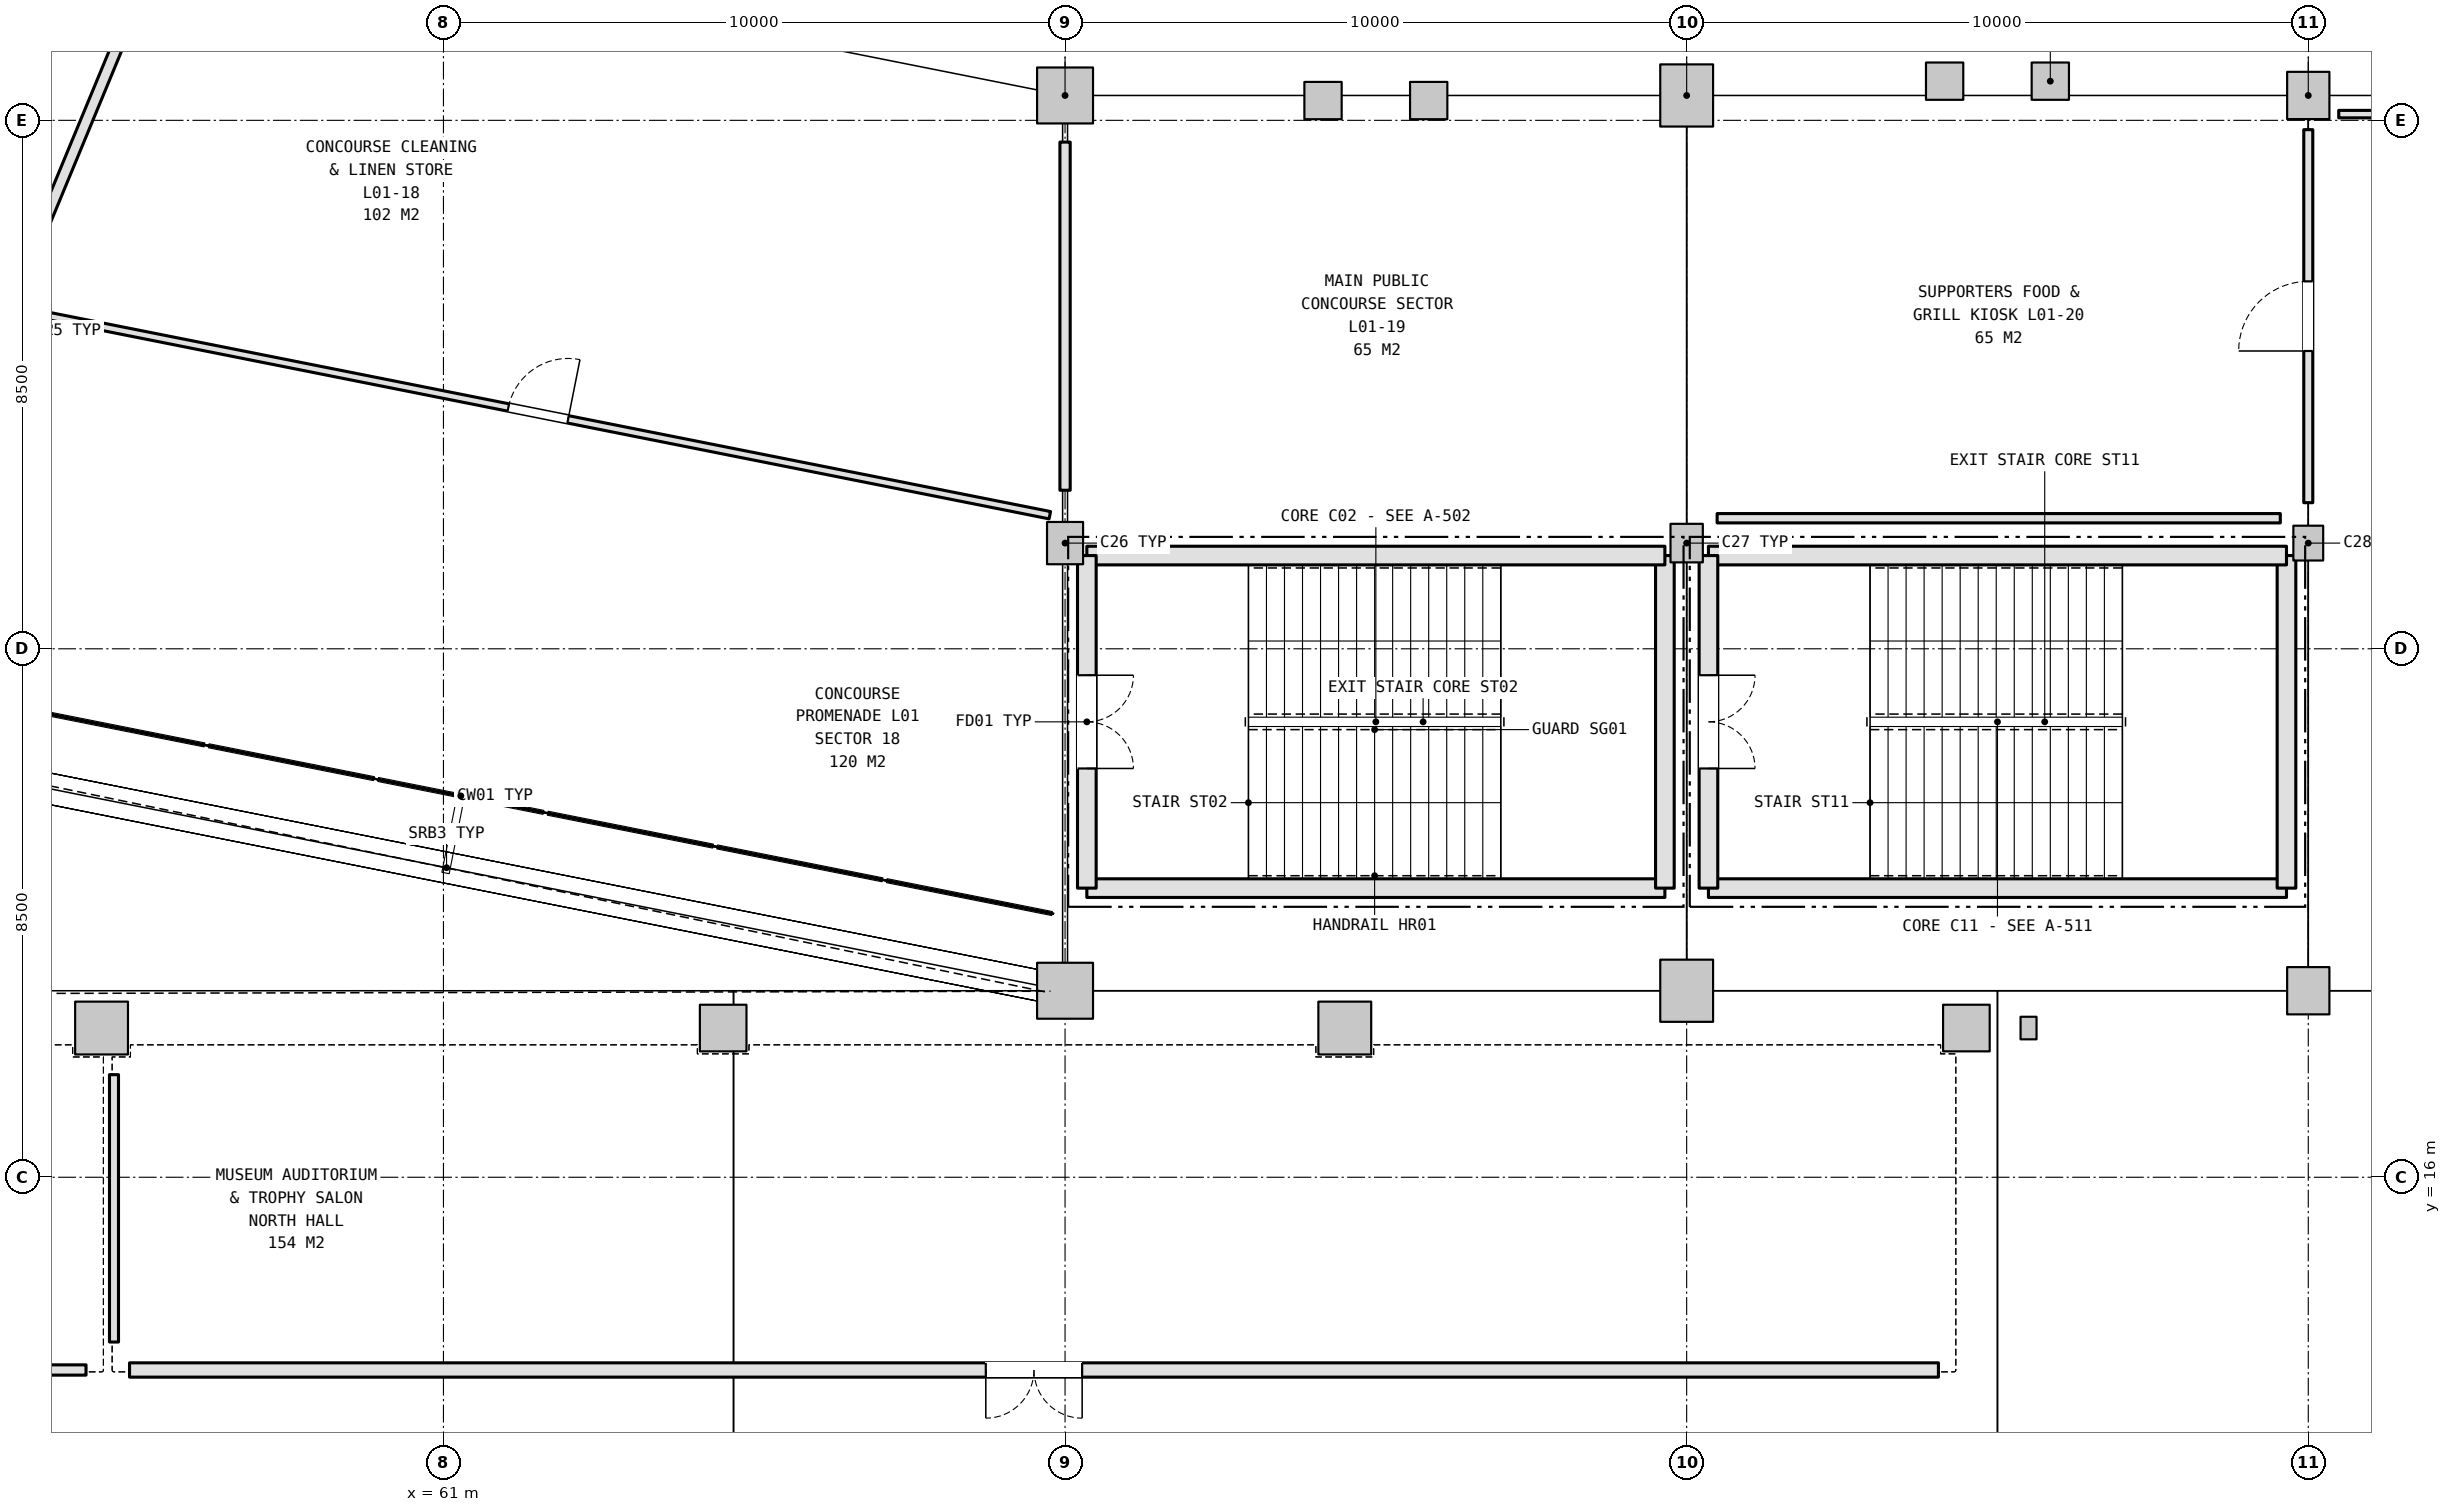
"""IFC4 building model, lengths in metres.
Left out: names, types, materials, properties, quantities, classifications, styles, units other than length and angle.
Written with IfcOpenShell. Run it as: python <this file> out.ifc"""

import sys

from ifc_helpers import new_model, si_unit, direction, frame, frame_2d, origin, origin_2d, place, context, subcontext, project, spatial, rectangle, i_section, extrude, element, fill, save


model = new_model("IFC4")
c1 = context("Model", 3, precision=1e-05, world=origin(), true_north=direction((0.0, 1.0)))
c2 = subcontext(c1, "Body", "Model", "MODEL_VIEW")
j1 = project(units=[si_unit("LENGTHUNIT", "METRE"), si_unit("PLANEANGLEUNIT", "RADIAN")], contexts=[c1])
p1 = place(None, origin())
s1 = spatial("IfcSite", under=j1, at=p1, CompositionType="ELEMENT")
p2 = place(p1, origin())
s2 = spatial("IfcBuilding", under=s1, at=p2, CompositionType="ELEMENT")
p3 = place(p2, frame((0.0, 0.0, 5.4)))
s3 = spatial("IfcBuildingStorey", under=s2, at=p3, CompositionType="ELEMENT", Elevation=5.4)
p4 = place(p3, frame((71.0, 33.4, 0.0), z_axis=(0.0, 0.0, 1.0), x_axis=(1.0, 0.0, 0.0)))
e1 = element("IfcColumn", 1, at=p4, inside=s3, PredefinedType="COLUMN", context=c2, shape_type="SweptSolid", body=[
    extrude(rectangle(XDim=0.9, YDim=0.9, at=origin_2d()), origin(), (0.0, 0.0, 1.0), 5.4),
])
p5 = place(p3, frame((71.0, 26.2, 0.0), z_axis=(0.0, 0.0, 1.0), x_axis=(1.0, 0.0, 0.0)))
e2 = element("IfcColumn", 2, at=p5, inside=s3, PredefinedType="COLUMN", context=c2, shape_type="SweptSolid", body=[
    extrude(rectangle(XDim=0.58, YDim=0.68, at=origin_2d()), origin(), (0.0, 0.0, 1.0), 5.4),
])
p6 = place(p3, frame((71.0, 19.0, 0.0), z_axis=(0.0, 0.0, 1.0), x_axis=(1.0, 0.0, 0.0)))
e3 = element("IfcColumn", 3, at=p6, inside=s3, PredefinedType="COLUMN", context=c2, shape_type="SweptSolid", body=[
    extrude(rectangle(XDim=0.9, YDim=0.9, at=origin_2d()), origin(), (0.0, 0.0, 1.0), 5.4),
])
p7 = place(p3, frame((81.0, 33.4, 0.0), z_axis=(0.0, 0.0, 1.0), x_axis=(1.0, 0.0, 0.0)))
e4 = element("IfcColumn", 4, at=p7, inside=s3, PredefinedType="COLUMN", context=c2, shape_type="SweptSolid", body=[
    extrude(rectangle(XDim=0.85, YDim=1.0, at=origin_2d()), origin(), (0.0, 0.0, 1.0), 5.4),
])
p8 = place(p3, frame((81.0, 26.2, 0.0), z_axis=(0.0, 0.0, 1.0), x_axis=(1.0, 0.0, 0.0)))
e5 = element("IfcColumn", 5, at=p8, inside=s3, PredefinedType="COLUMN", context=c2, shape_type="SweptSolid", body=[
    extrude(rectangle(XDim=0.52, YDim=0.62, at=origin_2d()), origin(), (0.0, 0.0, 1.0), 5.4),
])
p9 = place(p3, frame((81.0, 19.0, 0.0), z_axis=(0.0, 0.0, 1.0), x_axis=(1.0, 0.0, 0.0)))
e6 = element("IfcColumn", 6, at=p9, inside=s3, PredefinedType="COLUMN", context=c2, shape_type="SweptSolid", body=[
    extrude(rectangle(XDim=0.85, YDim=1.0, at=origin_2d()), origin(), (0.0, 0.0, 1.0), 5.4),
])
p10 = place(p3, frame((91.0, 33.4, 0.0), z_axis=(0.0, 0.0, 1.0), x_axis=(1.0, 0.0, 0.0)))
e7 = element("IfcColumn", 7, at=p10, inside=s3, PredefinedType="COLUMN", context=c2, shape_type="SweptSolid", body=[
    extrude(rectangle(XDim=0.68, YDim=0.76, at=origin_2d()), origin(), (0.0, 0.0, 1.0), 5.4),
])
p11 = place(p3, frame((91.0, 26.2, 0.0), z_axis=(0.0, 0.0, 1.0), x_axis=(1.0, 0.0, 0.0)))
e8 = element("IfcColumn", 8, at=p11, inside=s3, PredefinedType="COLUMN", context=c2, shape_type="SweptSolid", body=[
    extrude(rectangle(XDim=0.48, YDim=0.56, at=origin_2d()), origin(), (0.0, 0.0, 1.0), 5.4),
])
p12 = place(p3, frame((91.0, 19.0, 0.0), z_axis=(0.0, 0.0, 1.0), x_axis=(1.0, 0.0, 0.0)))
e9 = element("IfcColumn", 9, at=p12, inside=s3, PredefinedType="COLUMN", context=c2, shape_type="SweptSolid", body=[
    extrude(rectangle(XDim=0.68, YDim=0.76, at=origin_2d()), origin(), (0.0, 0.0, 1.0), 5.4),
])
p13 = place(p3, frame((55.5, 18.4, 0.0), z_axis=(0.0, 0.0, 1.0), x_axis=(1.0, 0.0, 0.0)))
e10 = element("IfcColumn", 10, at=p13, inside=s3, PredefinedType="COLUMN", context=c2, shape_type="SweptSolid", body=[
    extrude(rectangle(XDim=0.85, YDim=0.85, at=origin_2d()), origin(), (0.0, 0.0, 1.0), 5.4),
])
p14 = place(p3, frame((65.5, 18.4, 0.0), z_axis=(0.0, 0.0, 1.0), x_axis=(1.0, 0.0, 0.0)))
e11 = element("IfcColumn", 11, at=p14, inside=s3, PredefinedType="COLUMN", context=c2, shape_type="SweptSolid", body=[
    extrude(rectangle(XDim=0.75, YDim=0.75, at=origin_2d()), origin(), (0.0, 0.0, 1.0), 5.4),
])
p15 = place(p3, frame((75.5, 18.4, 0.0), z_axis=(0.0, 0.0, 1.0), x_axis=(1.0, 0.0, 0.0)))
e12 = element("IfcColumn", 12, at=p15, inside=s3, PredefinedType="COLUMN", context=c2, shape_type="SweptSolid", body=[
    extrude(rectangle(XDim=0.85, YDim=0.85, at=origin_2d()), origin(), (0.0, 0.0, 1.0), 5.4),
])
p16 = place(p3, frame((85.5, 18.4, 0.0), z_axis=(0.0, 0.0, 1.0), x_axis=(1.0, 0.0, 0.0)))
e13 = element("IfcColumn", 13, at=p16, inside=s3, PredefinedType="COLUMN", context=c2, shape_type="SweptSolid", body=[
    extrude(rectangle(XDim=0.75, YDim=0.75, at=origin_2d()), origin(), (0.0, 0.0, 1.0), 5.4),
])
p17 = place(p3, frame((86.5, 18.4, 0.0), z_axis=(0.0, 0.0, 1.0), x_axis=(1.0, 0.0, 0.0)))
e14 = element("IfcColumn", 14, at=p17, inside=s3, PredefinedType="COLUMN", context=c2, shape_type="SweptSolid", body=[
    extrude(i_section(OverallWidth=0.257, OverallDepth=0.363, WebThickness=0.013, FlangeThickness=0.022, FilletRadius=0.015, at=origin_2d()), origin(), (0.0, 0.0, 1.0), 5.4),
])
p18 = place(p3, frame((71.35, 20.65, 0.0), z_axis=(0.0, 0.0, 1.0), x_axis=(1.0, 0.0, 0.0)))
e15 = element("IfcWall", 15, at=p18, inside=s3, PredefinedType="SHEAR", context=c2, shape_type="SweptSolid", body=[
    extrude(rectangle(XDim=9.299, YDim=0.3, at=frame_2d((4.65, 0.0))), origin(), (0.0, 0.0, 1.0), 5.14),
])
p19 = place(p3, frame((80.65, 20.65, 0.0), z_axis=(0.0, 0.0, 1.0), x_axis=(0.0, 1.0, 0.0)))
e16 = element("IfcWall", 16, at=p19, inside=s3, PredefinedType="SHEAR", context=c2, shape_type="SweptSolid", body=[
    extrude(rectangle(XDim=5.349, YDim=0.3, at=frame_2d((2.675, 0.0))), origin(), (0.0, 0.0, 1.0), 5.14),
])
p20 = place(p3, frame((80.65, 26.0, 0.0), z_axis=(0.0, 0.0, 1.0), x_axis=(-1.0, 0.0, 0.0)))
e17 = element("IfcWall", 17, at=p20, inside=s3, PredefinedType="SHEAR", context=c2, shape_type="SweptSolid", body=[
    extrude(rectangle(XDim=9.299, YDim=0.3, at=frame_2d((4.65, 0.0))), origin(), (0.0, 0.0, 1.0), 5.14),
])
p21 = place(p3, frame((71.35, 26.0, 0.0), z_axis=(0.0, 0.0, 1.0), x_axis=(0.0, -1.0, 0.0)))
e18 = element("IfcWall", 18, at=p21, inside=s3, PredefinedType="SHEAR", context=c2, shape_type="SweptSolid", body=[
    extrude(rectangle(XDim=5.349, YDim=0.3, at=frame_2d((2.675, 0.0))), origin(), (0.0, 0.0, 1.0), 5.14),
])
p22 = place(p21, frame((1.925, 0.0, 0.0)))
e19 = element("IfcOpeningElement", 19, at=p22, cuts=e18, PredefinedType="OPENING", context=c2, shape_type="SweptSolid", body=[
    extrude(rectangle(XDim=1.5, YDim=2.2, at=frame_2d((0.75, 1.1))), frame((0.0, 0.16, 0.0), z_axis=(0.0, -1.0, 0.0), x_axis=(1.0, 0.0, 0.0)), (0.0, 0.0, 1.0), 0.32),
])
p23 = place(p3, frame((81.35, 20.65, 0.0), z_axis=(0.0, 0.0, 1.0), x_axis=(1.0, 0.0, 0.0)))
e20 = element("IfcWall", 20, at=p23, inside=s3, PredefinedType="SHEAR", context=c2, shape_type="SweptSolid", body=[
    extrude(rectangle(XDim=9.299, YDim=0.3, at=frame_2d((4.65, 0.0))), origin(), (0.0, 0.0, 1.0), 5.14),
])
p24 = place(p3, frame((90.65, 20.65, 0.0), z_axis=(0.0, 0.0, 1.0), x_axis=(0.0, 1.0, 0.0)))
e21 = element("IfcWall", 21, at=p24, inside=s3, PredefinedType="SHEAR", context=c2, shape_type="SweptSolid", body=[
    extrude(rectangle(XDim=5.349, YDim=0.3, at=frame_2d((2.675, 0.0))), origin(), (0.0, 0.0, 1.0), 5.14),
])
p25 = place(p3, frame((90.65, 26.0, 0.0), z_axis=(0.0, 0.0, 1.0), x_axis=(-1.0, 0.0, 0.0)))
e22 = element("IfcWall", 22, at=p25, inside=s3, PredefinedType="SHEAR", context=c2, shape_type="SweptSolid", body=[
    extrude(rectangle(XDim=9.299, YDim=0.3, at=frame_2d((4.65, 0.0))), origin(), (0.0, 0.0, 1.0), 5.14),
])
p26 = place(p3, frame((81.35, 26.0, 0.0), z_axis=(0.0, 0.0, 1.0), x_axis=(0.0, -1.0, 0.0)))
e23 = element("IfcWall", 23, at=p26, inside=s3, PredefinedType="SHEAR", context=c2, shape_type="SweptSolid", body=[
    extrude(rectangle(XDim=5.349, YDim=0.3, at=frame_2d((2.675, 0.0))), origin(), (0.0, 0.0, 1.0), 5.14),
])
p27 = place(p26, frame((1.925, 0.0, 0.0)))
e24 = element("IfcOpeningElement", 24, at=p27, cuts=e23, PredefinedType="OPENING", context=c2, shape_type="SweptSolid", body=[
    extrude(rectangle(XDim=1.5, YDim=2.2, at=frame_2d((0.75, 1.1))), frame((0.0, 0.16, 0.0), z_axis=(0.0, -1.0, 0.0), x_axis=(1.0, 0.0, 0.0)), (0.0, 0.0, 1.0), 0.32),
])
for number, where, z_axis, x_axis in (
    (25, (86.85, 33.63, 0.0), (0.0, 0.0, 1.0), (1.0, 0.0, 0.0)),
    (26, (85.15, 33.63, 0.0), (0.0, 0.0, 1.0), (1.0, 0.0, 0.0)),
    (27, (76.85, 33.318, 0.0), (0.0, 0.0, 1.0), (1.0, 0.0, 0.0)),
    (28, (75.15, 33.318, 0.0), (0.0, 0.0, 1.0), (1.0, 0.0, 0.0)),
):
    element("IfcColumn", number, at=place(p3, frame(where, z_axis=z_axis, x_axis=x_axis)), inside=s3, PredefinedType="COLUMN", context=c2, shape_type="SweptSolid", body=[
        extrude(rectangle(XDim=0.6, YDim=0.6, at=origin_2d()), origin(), (0.0, 0.0, 1.0), 5.4),
    ])
p28 = place(p3, frame((55.25, 12.9, 0.0), z_axis=(0.0, 0.0, 1.0), x_axis=(-1.0, 0.0, 0.0)))
e29 = element("IfcWall", 29, at=p28, inside=s3, PredefinedType="PARTITIONING", context=c2, shape_type="SweptSolid", body=[
    extrude(rectangle(XDim=29.3, YDim=0.165, at=frame_2d((14.65, 0.0))), origin(), (0.0, 0.0, 1.0), 4.425),
])
p29 = place(p28, frame((14.11, 0.0, 0.0)))
e30 = element("IfcOpeningElement", 30, at=p29, cuts=e29, PredefinedType="OPENING", context=c2, shape_type="SweptSolid", body=[
    extrude(rectangle(XDim=1.08, YDim=2.25, at=frame_2d((0.54, 1.125))), frame((0.0, 0.093, 0.0), z_axis=(0.0, -1.0, 0.0), x_axis=(1.0, 0.0, 0.0)), (0.0, 0.0, 1.0), 0.185),
])
p30 = place(p3, frame((85.05, 12.9, 0.0), z_axis=(0.0, 0.0, 1.0), x_axis=(-1.0, 0.0, 0.0)))
e31 = element("IfcWall", 31, at=p30, inside=s3, PredefinedType="PLUMBINGWALL", context=c2, shape_type="SweptSolid", body=[
    extrude(rectangle(XDim=29.1, YDim=0.23, at=frame_2d((14.55, 0.0))), origin(), (0.0, 0.0, 1.0), 4.425),
])
p31 = place(p30, frame((13.775, 0.0, 0.0)))
e32 = element("IfcOpeningElement", 32, at=p31, cuts=e31, PredefinedType="OPENING", context=c2, shape_type="SweptSolid", body=[
    extrude(rectangle(XDim=1.55, YDim=2.15, at=frame_2d((0.775, 1.075))), frame((0.0, 0.125, 0.0), z_axis=(0.0, -1.0, 0.0), x_axis=(1.0, 0.0, 0.0)), (0.0, 0.0, 1.0), 0.25),
])
p32 = place(p3, frame((55.7, 13.35, 0.0), z_axis=(0.0, 0.0, 1.0), x_axis=(0.0, 1.0, 0.0)))
e33 = element("IfcWall", 33, at=p32, inside=s3, PredefinedType="PARTITIONING", context=c2, shape_type="SweptSolid", body=[
    extrude(rectangle(XDim=4.3, YDim=0.145, at=frame_2d((2.15, 0.0))), origin(), (0.0, 0.0, 1.0), 4.425),
])
p33 = place(p3, frame((56.324, 35.569, 0.0), z_axis=(0.0, 0.0, 1.0), x_axis=(-0.382682918336, -0.923879745429, 0.0)))
e34 = element("IfcWall", 34, at=p33, inside=s3, PredefinedType="PARTITIONING", context=c2, shape_type="SweptSolid", body=[
    extrude(rectangle(XDim=5.6, YDim=0.185, at=frame_2d((2.8, 0.0))), origin(), (0.0, 0.0, 1.0), 4.375),
])
p34 = place(p3, frame((70.755, 26.649, 0.0), z_axis=(0.0, 0.0, 1.0), x_axis=(-0.980783244425, 0.195100557291, 0.0)))
e35 = element("IfcWall", 35, at=p34, inside=s3, PredefinedType="PARTITIONING", context=c2, shape_type="SweptSolid", body=[
    extrude(rectangle(XDim=16.783, YDim=0.12, at=frame_2d((8.392, 0.0))), origin(), (0.0, 0.0, 1.0), 4.375),
])
p35 = place(p34, frame((7.902, 0.0, 0.0)))
e36 = element("IfcOpeningElement", 36, at=p35, cuts=e35, PredefinedType="OPENING", context=c2, shape_type="SweptSolid", body=[
    extrude(rectangle(XDim=0.98, YDim=2.15, at=frame_2d((0.49, 1.075))), frame((0.0, 0.07, 0.0), z_axis=(0.0, -1.0, 0.0), x_axis=(1.0, 0.0, 0.0)), (0.0, 0.0, 1.0), 0.14),
])
p36 = place(p3, frame((71.0, 32.65, 0.0), z_axis=(0.0, 0.0, 1.0), x_axis=(0.0, -1.0, 0.0)))
e37 = element("IfcWall", 37, at=p36, inside=s3, PredefinedType="PARTITIONING", context=c2, shape_type="SweptSolid", body=[
    extrude(rectangle(XDim=5.6, YDim=0.165, at=frame_2d((2.8, 0.0))), origin(), (0.0, 0.0, 1.0), 4.365),
])
p37 = place(p3, frame((91.0, 32.85, 0.0), z_axis=(0.0, 0.0, 1.0), x_axis=(0.0, -1.0, 0.0)))
e38 = element("IfcWall", 38, at=p37, inside=s3, PredefinedType="PARTITIONING", context=c2, shape_type="SweptSolid", body=[
    extrude(rectangle(XDim=6.0, YDim=0.145, at=frame_2d((3.0, 0.0))), origin(), (0.0, 0.0, 1.0), 4.305),
])
p38 = place(p37, frame((2.44, 0.0, 0.0)))
e39 = element("IfcOpeningElement", 39, at=p38, cuts=e38, PredefinedType="OPENING", context=c2, shape_type="SweptSolid", body=[
    extrude(rectangle(XDim=1.12, YDim=2.2, at=frame_2d((0.56, 1.1))), frame((0.0, 0.083, 0.0), z_axis=(0.0, -1.0, 0.0), x_axis=(1.0, 0.0, 0.0)), (0.0, 0.0, 1.0), 0.165),
])
p39 = place(p3, frame((90.55, 26.6, 0.0), z_axis=(0.0, 0.0, 1.0), x_axis=(-1.0, 0.0, 0.0)))
e40 = element("IfcWall", 40, at=p39, inside=s3, PredefinedType="PARTITIONING", context=c2, shape_type="SweptSolid", body=[
    extrude(rectangle(XDim=9.06, YDim=0.15, at=frame_2d((4.53, 0.0))), origin(), (0.0, 0.0, 1.0), 5.12),
])
p40 = place(p3, frame((91.49, 33.1, 0.0), z_axis=(0.0, 0.0, 1.0), x_axis=(1.0, 0.0, 0.0)))
e41 = element("IfcWall", 41, at=p40, inside=s3, PredefinedType="PARTITIONING", context=c2, shape_type="SweptSolid", body=[
    extrude(rectangle(XDim=9.06, YDim=0.12, at=frame_2d((4.53, 0.0))), origin(), (0.0, 0.0, 1.0), 4.405),
])
p41 = place(p22, origin())
e42 = element("IfcDoor", 42, at=p41, inside=s3, OperationType="DOUBLE_DOOR_SINGLE_SWING", PredefinedType="DOOR", context=c2, shape_type="SweptSolid", body=[
    extrude(rectangle(XDim=1.5, YDim=2.2, at=frame_2d((0.75, 1.1))), frame((0.0, 0.025, 0.0), z_axis=(0.0, -1.0, 0.0), x_axis=(1.0, 0.0, 0.0)), (0.0, 0.0, 1.0), 0.05),
])
fill(e19, e42)
p42 = place(p27, origin())
e43 = element("IfcDoor", 43, at=p42, inside=s3, OperationType="DOUBLE_DOOR_SINGLE_SWING", PredefinedType="DOOR", context=c2, shape_type="SweptSolid", body=[
    extrude(rectangle(XDim=1.5, YDim=2.2, at=frame_2d((0.75, 1.1))), frame((0.0, 0.025, 0.0), z_axis=(0.0, -1.0, 0.0), x_axis=(1.0, 0.0, 0.0)), (0.0, 0.0, 1.0), 0.05),
])
fill(e24, e43)
p43 = place(p31, origin())
e44 = element("IfcDoor", 44, at=p43, inside=s3, OperationType="DOUBLE_DOOR_SINGLE_SWING", PredefinedType="DOOR", context=c2, shape_type="SweptSolid", body=[
    extrude(rectangle(XDim=1.55, YDim=2.15, at=frame_2d((0.775, 1.075))), frame((0.0, 0.025, 0.0), z_axis=(0.0, -1.0, 0.0), x_axis=(1.0, 0.0, 0.0)), (0.0, 0.0, 1.0), 0.05),
])
fill(e32, e44)
p44 = place(p35, frame((0.98, 0.0, 0.0), z_axis=(0.0, 0.0, 1.0), x_axis=(-1.0, 0.0, 0.0)))
e45 = element("IfcDoor", 45, at=p44, inside=s3, OperationType="SINGLE_SWING_LEFT", PredefinedType="DOOR", context=c2, shape_type="SweptSolid", body=[
    extrude(rectangle(XDim=0.98, YDim=2.15, at=frame_2d((0.49, 1.075))), frame((0.0, 0.025, 0.0), z_axis=(0.0, -1.0, 0.0), x_axis=(1.0, 0.0, 0.0)), (0.0, 0.0, 1.0), 0.05),
])
fill(e36, e45)
p45 = place(p38, frame((1.12, 0.0, 0.0), z_axis=(0.0, 0.0, 1.0), x_axis=(-1.0, 0.0, 0.0)))
e46 = element("IfcDoor", 46, at=p45, inside=s3, OperationType="SINGLE_SWING_RIGHT", PredefinedType="DOOR", context=c2, shape_type="SweptSolid", body=[
    extrude(rectangle(XDim=1.12, YDim=2.2, at=frame_2d((0.56, 1.1))), frame((0.0, 0.025, 0.0), z_axis=(0.0, -1.0, 0.0), x_axis=(1.0, 0.0, 0.0)), (0.0, 0.0, 1.0), 0.05),
])
fill(e39, e46)
save(model, sys.argv[1])
